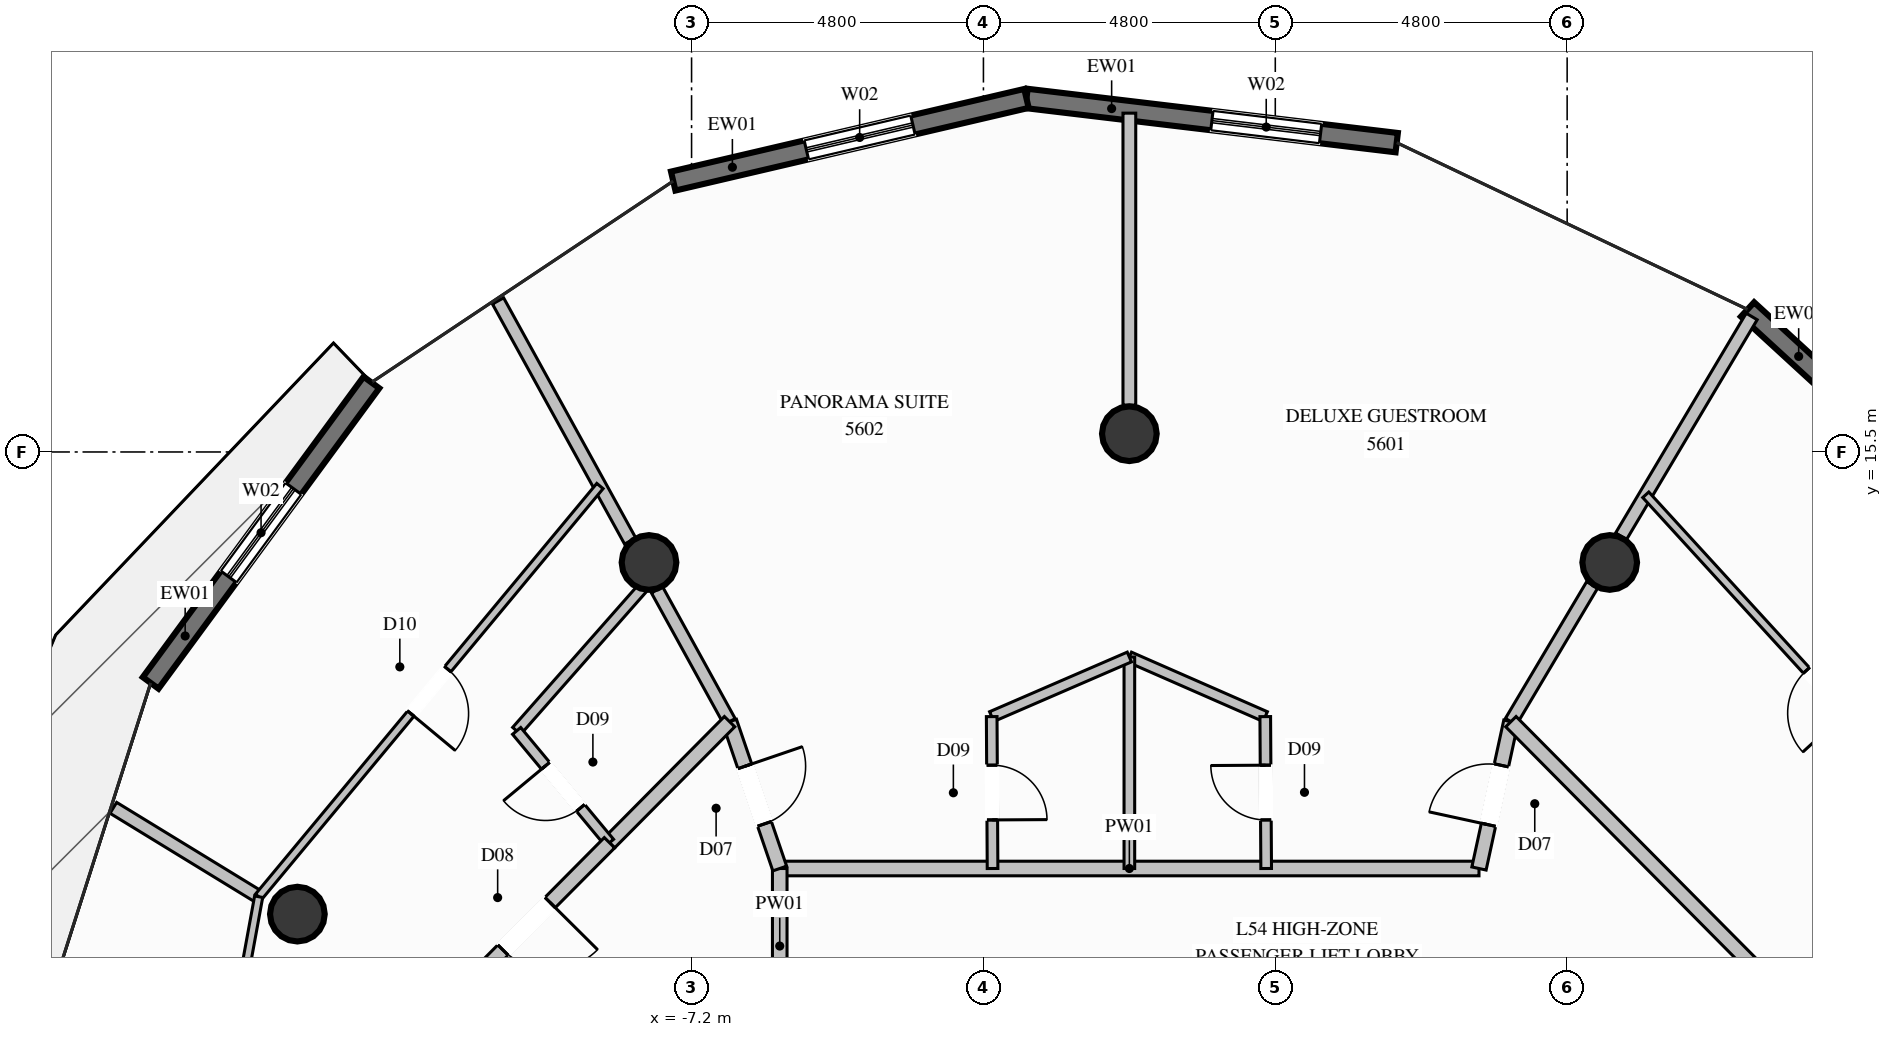
"""IFC4 building model, lengths in metres.
Left out: names, types, materials, properties, quantities, classifications, styles, units other than length and angle.
Written with IfcOpenShell. Run it as: python <this file> out.ifc"""

import sys

from ifc_helpers import new_model, si_unit, direction, frame, frame_2d, origin, origin_2d, place, context, subcontext, project, spatial, rectangle, circle, extrude, element, fill, save


model = new_model("IFC4")
c1 = context("Model", 3, precision=1e-05, world=origin(), true_north=direction((0.0, 1.0)))
c2 = subcontext(c1, "Body", "Model", "MODEL_VIEW")
j1 = project(units=[si_unit("LENGTHUNIT", "METRE"), si_unit("PLANEANGLEUNIT", "RADIAN")], contexts=[c1])
p1 = place(None, origin())
s1 = spatial("IfcSite", under=j1, at=p1, CompositionType="ELEMENT")
p2 = place(p1, origin())
s2 = spatial("IfcBuilding", under=s1, at=p2, CompositionType="ELEMENT")
p3 = place(p2, frame((0.0, 0.0, 209.2)))
s3 = spatial("IfcBuildingStorey", under=s2, at=p3, CompositionType="ELEMENT", Elevation=209.2)
for number, where, z_axis, x_axis in (
    (1, (7.9, 13.683, 0.0), (0.0, 0.0, 1.0), (1.0, 0.0, 0.0)),
    (2, (0.0, 15.8, 0.0), (0.0, 0.0, 1.0), (1.0, 0.0, 0.0)),
    (3, (-7.9, 13.683, 0.0), (0.0, 0.0, 1.0), (1.0, 0.0, 0.0)),
    (4, (-13.683, 7.9, 0.0), (0.0, 0.0, 1.0), (1.0, 0.0, 0.0)),
):
    element("IfcColumn", number, at=place(p3, frame(where, z_axis=z_axis, x_axis=x_axis)), inside=s3, PredefinedType="COLUMN", context=c2, shape_type="SweptSolid", body=[
        extrude(circle(Radius=0.45, at=origin_2d()), origin(), (0.0, 0.0, 1.0), 3.6),
    ])
p4 = place(p3, frame((10.167, 17.844, 0.0), z_axis=(0.0, 0.0, 1.0), x_axis=(0.736523155924, -0.676412330452, 0.0)))
e5 = element("IfcWall", 5, at=p4, inside=s3, PredefinedType="SOLIDWALL", context=c2, shape_type="SweptSolid", body=[
    extrude(rectangle(XDim=6.636, YDim=0.32, at=frame_2d((3.318, 0.0))), origin(), (0.0, 0.0, 1.0), 3.36),
])
p5 = place(p4, frame((2.533, 0.0, 0.35)))
e6 = element("IfcOpeningElement", 6, at=p5, cuts=e5, PredefinedType="OPENING", context=c2, shape_type="SweptSolid", body=[
    extrude(rectangle(XDim=1.8, YDim=2.6, at=frame_2d((0.9, 1.3))), frame((0.0, 0.17, 0.0), z_axis=(0.0, -1.0, 0.0), x_axis=(1.0, 0.0, 0.0)), (0.0, 0.0, 1.0), 0.34),
])
p6 = place(p3, frame((-1.692, 21.314, 0.0), z_axis=(0.0, 0.0, 1.0), x_axis=(0.99294637343, -0.118564326386, 0.0)))
e7 = element("IfcWall", 7, at=p6, inside=s3, PredefinedType="SOLIDWALL", context=c2, shape_type="SweptSolid", body=[
    extrude(rectangle(XDim=6.132, YDim=0.32, at=frame_2d((3.066, 0.0))), origin(), (0.0, 0.0, 1.0), 3.36),
])
p7 = place(p6, frame((3.071, 0.0, 0.35)))
e8 = element("IfcOpeningElement", 8, at=p7, cuts=e7, PredefinedType="OPENING", context=c2, shape_type="SweptSolid", body=[
    extrude(rectangle(XDim=1.8, YDim=2.6, at=frame_2d((0.9, 1.3))), frame((0.0, 0.17, 0.0), z_axis=(0.0, -1.0, 0.0), x_axis=(1.0, 0.0, 0.0)), (0.0, 0.0, 1.0), 0.34),
])
p8 = place(p3, frame((-7.502, 19.955, 0.0), z_axis=(0.0, 0.0, 1.0), x_axis=(0.97372216523, 0.227739203785, 0.0)))
e9 = element("IfcWall", 9, at=p8, inside=s3, PredefinedType="SOLIDWALL", context=c2, shape_type="SweptSolid", body=[
    extrude(rectangle(XDim=5.967, YDim=0.32, at=frame_2d((2.983, 0.0))), origin(), (0.0, 0.0, 1.0), 3.36),
])
p9 = place(p8, frame((2.249, 0.0, 0.35)))
e10 = element("IfcOpeningElement", 10, at=p9, cuts=e9, PredefinedType="OPENING", context=c2, shape_type="SweptSolid", body=[
    extrude(rectangle(XDim=1.8, YDim=2.6, at=frame_2d((0.9, 1.3))), frame((0.0, 0.17, 0.0), z_axis=(0.0, -1.0, 0.0), x_axis=(1.0, 0.0, 0.0)), (0.0, 0.0, 1.0), 0.34),
])
p10 = place(p3, frame((-16.096, 11.702, 0.0), z_axis=(0.0, 0.0, 1.0), x_axis=(0.592141869209, 0.805833733924, 0.0)))
e11 = element("IfcWall", 11, at=p10, inside=s3, PredefinedType="SOLIDWALL", context=c2, shape_type="SweptSolid", body=[
    extrude(rectangle(XDim=6.132, YDim=0.32, at=frame_2d((3.066, 0.0))), origin(), (0.0, 0.0, 1.0), 3.36),
])
p11 = place(p10, frame((2.166, 0.0, 0.35)))
e12 = element("IfcOpeningElement", 12, at=p11, cuts=e11, PredefinedType="OPENING", context=c2, shape_type="SweptSolid", body=[
    extrude(rectangle(XDim=1.8, YDim=2.6, at=frame_2d((0.9, 1.3))), frame((0.0, 0.17, 0.0), z_axis=(0.0, -1.0, 0.0), x_axis=(1.0, 0.0, 0.0)), (0.0, 0.0, 1.0), 0.34),
])
p12 = place(p3, frame((-5.75, 8.65, 0.0), z_axis=(0.0, 0.0, 1.0), x_axis=(1.0, 0.0, 0.0)))
e13 = element("IfcWall", 13, at=p12, inside=s3, PredefinedType="PARTITIONING", context=c2, shape_type="SweptSolid", body=[
    extrude(rectangle(XDim=11.5, YDim=0.24, at=frame_2d((5.75, 0.0))), origin(), (0.0, 0.0, 1.0), 3.36),
])
p13 = place(p3, frame((-5.75, 6.1, 0.0), z_axis=(0.0, 0.0, 1.0), x_axis=(0.0, 1.0, 0.0)))
e14 = element("IfcWall", 14, at=p13, inside=s3, PredefinedType="PARTITIONING", context=c2, shape_type="SweptSolid", body=[
    extrude(rectangle(XDim=2.55, YDim=0.24, at=frame_2d((1.275, 0.0))), origin(), (0.0, 0.0, 1.0), 3.36),
])
p14 = place(p3, frame((6.275, 11.065, 0.0), z_axis=(0.0, 0.0, 1.0), x_axis=(0.510935579326, 0.859619005013, 0.0)))
e15 = element("IfcWall", 15, at=p14, inside=s3, PredefinedType="PARTITIONING", context=c2, shape_type="SweptSolid", body=[
    extrude(rectangle(XDim=2.615, YDim=0.21, at=frame_2d((1.308, 0.0))), origin(), (0.0, 0.0, 1.0), 2.801),
])
p15 = place(p3, frame((8.087, 14.114, 0.0), z_axis=(0.0, 0.0, 1.0), x_axis=(0.510955957876, 0.859606892196, 0.0)))
e16 = element("IfcWall", 16, at=p15, inside=s3, PredefinedType="PARTITIONING", context=c2, shape_type="SweptSolid", body=[
    extrude(rectangle(XDim=4.204, YDim=0.21, at=frame_2d((2.102, 0.0))), origin(), (0.0, 0.0, 1.0), 3.36),
])
p16 = place(p3, frame((-6.575, 11.065, 0.0), z_axis=(0.0, 0.0, 1.0), x_axis=(-0.482312715348, 0.875999112222, 0.0)))
e17 = element("IfcWall", 17, at=p16, inside=s3, PredefinedType="PARTITIONING", context=c2, shape_type="SweptSolid", body=[
    extrude(rectangle(XDim=2.474, YDim=0.21, at=frame_2d((1.237, 0.0))), origin(), (0.0, 0.0, 1.0), 2.801),
])
p17 = place(p3, frame((-8.21, 14.036, 0.0), z_axis=(0.0, 0.0, 1.0), x_axis=(-0.482207793196, 0.876056872686, 0.0)))
e18 = element("IfcWall", 18, at=p17, inside=s3, PredefinedType="PARTITIONING", context=c2, shape_type="SweptSolid", body=[
    extrude(rectangle(XDim=4.507, YDim=0.21, at=frame_2d((2.253, 0.0))), origin(), (0.0, 0.0, 1.0), 3.36),
])
p18 = place(p3, frame((0.0, 12.128, 0.0), z_axis=(0.0, 0.0, 1.0), x_axis=(0.915837910364, -0.401548156439, 0.0)))
e19 = element("IfcWall", 19, at=p18, inside=s3, PredefinedType="PLUMBINGWALL", context=c2, shape_type="SweptSolid", body=[
    extrude(rectangle(XDim=2.44, YDim=0.175, at=frame_2d((1.22, 0.0))), origin(), (0.0, 0.0, 1.0), 3.36),
])
p19 = place(p3, frame((0.0, 12.128, 0.0), z_axis=(0.0, 0.0, 1.0), x_axis=(0.0, -1.0, 0.0)))
e20 = element("IfcWall", 20, at=p19, inside=s3, PredefinedType="PLUMBINGWALL", context=c2, shape_type="SweptSolid", body=[
    extrude(rectangle(XDim=3.478, YDim=0.175, at=frame_2d((1.739, 0.0))), origin(), (0.0, 0.0, 1.0), 3.36),
])
p20 = place(p3, frame((2.25, 8.65, 0.0), z_axis=(0.0, 0.0, 1.0), x_axis=(-0.005961582878, 0.999982229607, 0.0)))
e21 = element("IfcWall", 21, at=p20, inside=s3, PredefinedType="PLUMBINGWALL", context=c2, shape_type="SweptSolid", body=[
    extrude(rectangle(XDim=2.498, YDim=0.175, at=frame_2d((1.249, 0.0))), origin(), (0.0, 0.0, 1.0), 3.36),
])
p21 = place(p20, frame((0.799, 0.0, 0.0)))
e22 = element("IfcOpeningElement", 22, at=p21, cuts=e21, PredefinedType="OPENING", context=c2, shape_type="SweptSolid", body=[
    extrude(rectangle(XDim=0.9, YDim=2.1, at=frame_2d((0.45, 1.05))), frame((0.0, 0.098, 0.0), z_axis=(0.0, -1.0, 0.0), x_axis=(1.0, 0.0, 0.0)), (0.0, 0.0, 1.0), 0.195),
])
p22 = place(p3, frame((0.0, 16.27, 0.0), z_axis=(0.0, 0.0, 1.0), x_axis=(0.0, 1.0, 0.0)))
e23 = element("IfcWall", 23, at=p22, inside=s3, PredefinedType="PARTITIONING", context=c2, shape_type="SweptSolid", body=[
    extrude(rectangle(XDim=4.802, YDim=0.21, at=frame_2d((2.401, 0.0))), origin(), (0.0, 0.0, 1.0), 3.36),
])
p23 = place(p3, frame((5.75, 8.65, 0.0), z_axis=(0.0, 0.0, 1.0), x_axis=(0.212388632151, 0.977185278713, 0.0)))
e24 = element("IfcWall", 24, at=p23, inside=s3, PredefinedType="PARTITIONING", context=c2, shape_type="SweptSolid", body=[
    extrude(rectangle(XDim=2.471, YDim=0.24, at=frame_2d((1.236, 0.0))), origin(), (0.0, 0.0, 1.0), 3.36),
])
p24 = place(p23, frame((0.736, 0.0, 0.0)))
e25 = element("IfcOpeningElement", 25, at=p24, cuts=e24, PredefinedType="OPENING", context=c2, shape_type="SweptSolid", body=[
    extrude(rectangle(XDim=1.0, YDim=2.2, at=frame_2d((0.5, 1.1))), frame((0.0, 0.13, 0.0), z_axis=(0.0, -1.0, 0.0), x_axis=(1.0, 0.0, 0.0)), (0.0, 0.0, 1.0), 0.26),
])
p25 = place(p3, frame((-2.264, 11.148, 0.0), z_axis=(0.0, 0.0, 1.0), x_axis=(0.917710808699, 0.397249130391, 0.0)))
e26 = element("IfcWall", 26, at=p25, inside=s3, PredefinedType="PLUMBINGWALL", context=c2, shape_type="SweptSolid", body=[
    extrude(rectangle(XDim=2.467, YDim=0.175, at=frame_2d((1.233, 0.0))), origin(), (0.0, 0.0, 1.0), 3.36),
])
p26 = place(p3, frame((-2.264, 11.148, 0.0), z_axis=(0.0, 0.0, 1.0), x_axis=(0.005570671967, -0.999984483687, 0.0)))
e27 = element("IfcWall", 27, at=p26, inside=s3, PredefinedType="PLUMBINGWALL", context=c2, shape_type="SweptSolid", body=[
    extrude(rectangle(XDim=2.498, YDim=0.175, at=frame_2d((1.249, 0.0))), origin(), (0.0, 0.0, 1.0), 3.36),
])
p27 = place(p26, frame((0.799, 0.0, 0.0)))
e28 = element("IfcOpeningElement", 28, at=p27, cuts=e27, PredefinedType="OPENING", context=c2, shape_type="SweptSolid", body=[
    extrude(rectangle(XDim=0.9, YDim=2.1, at=frame_2d((0.45, 1.05))), frame((0.0, 0.098, 0.0), z_axis=(0.0, -1.0, 0.0), x_axis=(1.0, 0.0, 0.0)), (0.0, 0.0, 1.0), 0.195),
])
p28 = place(p3, frame((-6.575, 11.065, 0.0), z_axis=(0.0, 0.0, 1.0), x_axis=(0.323250422642, -0.946313459833, 0.0)))
e29 = element("IfcWall", 29, at=p28, inside=s3, PredefinedType="PARTITIONING", context=c2, shape_type="SweptSolid", body=[
    extrude(rectangle(XDim=2.552, YDim=0.24, at=frame_2d((1.276, 0.0))), origin(), (0.0, 0.0, 1.0), 3.36),
])
p29 = place(p28, frame((0.776, 0.0, 0.0)))
e30 = element("IfcOpeningElement", 30, at=p29, cuts=e29, PredefinedType="OPENING", context=c2, shape_type="SweptSolid", body=[
    extrude(rectangle(XDim=1.0, YDim=2.2, at=frame_2d((0.5, 1.1))), frame((0.0, 0.13, 0.0), z_axis=(0.0, -1.0, 0.0), x_axis=(1.0, 0.0, 0.0)), (0.0, 0.0, 1.0), 0.26),
])
p30 = place(p3, frame((-6.575, 11.065, 0.0), z_axis=(0.0, 0.0, 1.0), x_axis=(-0.704271845888, -0.709930395947, 0.0)))
e31 = element("IfcWall", 31, at=p30, inside=s3, PredefinedType="PARTITIONING", context=c2, shape_type="SweptSolid", body=[
    extrude(rectangle(XDim=2.804, YDim=0.24, at=frame_2d((1.402, 0.0))), origin(), (0.0, 0.0, 1.0), 3.36),
])
p31 = place(p3, frame((-7.87, 13.417, 0.0), z_axis=(0.0, 0.0, 1.0), x_axis=(-0.661193309015, -0.750215574428, 0.0)))
e32 = element("IfcWall", 32, at=p31, inside=s3, PredefinedType="PLUMBINGWALL", context=c2, shape_type="SweptSolid", body=[
    extrude(rectangle(XDim=3.338, YDim=0.175, at=frame_2d((1.669, 0.0))), origin(), (0.0, 0.0, 1.0), 2.929),
])
p32 = place(p3, frame((-8.55, 9.074, 0.0), z_axis=(0.0, 0.0, 1.0), x_axis=(-0.638766783966, 0.769400413115, 0.0)))
e33 = element("IfcWall", 33, at=p32, inside=s3, PredefinedType="PLUMBINGWALL", context=c2, shape_type="SweptSolid", body=[
    extrude(rectangle(XDim=2.39, YDim=0.175, at=frame_2d((1.195, 0.0))), origin(), (0.0, 0.0, 1.0), 3.36),
])
p33 = place(p32, frame((0.745, 0.0, 0.0)))
e34 = element("IfcOpeningElement", 34, at=p33, cuts=e33, PredefinedType="OPENING", context=c2, shape_type="SweptSolid", body=[
    extrude(rectangle(XDim=0.9, YDim=2.1, at=frame_2d((0.45, 1.05))), frame((0.0, 0.098, 0.0), z_axis=(0.0, -1.0, 0.0), x_axis=(1.0, 0.0, 0.0)), (0.0, 0.0, 1.0), 0.195),
])
p34 = place(p3, frame((-14.32, 8.186, 0.0), z_axis=(0.0, 0.0, 1.0), x_axis=(-0.853055569856, 0.521820078895, 0.0)))
e35 = element("IfcWall", 35, at=p34, inside=s3, PredefinedType="PARTITIONING", context=c2, shape_type="SweptSolid", body=[
    extrude(rectangle(XDim=2.802, YDim=0.21, at=frame_2d((1.401, 0.0))), origin(), (0.0, 0.0, 1.0), 3.36),
])
p35 = place(p3, frame((-8.55, 9.074, 0.0), z_axis=(0.0, 0.0, 1.0), x_axis=(-0.704390934975, -0.709812236246, 0.0)))
e36 = element("IfcWall", 36, at=p35, inside=s3, PredefinedType="PARTITIONING", context=c2, shape_type="SweptSolid", body=[
    extrude(rectangle(XDim=3.873, YDim=0.24, at=frame_2d((1.937, 0.0))), origin(), (0.0, 0.0, 1.0), 3.36),
])
p36 = place(p35, frame((1.386, 0.0, 0.0)))
e37 = element("IfcOpeningElement", 37, at=p36, cuts=e36, PredefinedType="OPENING", context=c2, shape_type="SweptSolid", body=[
    extrude(rectangle(XDim=1.1, YDim=2.3, at=frame_2d((0.55, 1.15))), frame((0.0, 0.13, 0.0), z_axis=(0.0, -1.0, 0.0), x_axis=(1.0, 0.0, 0.0)), (0.0, 0.0, 1.0), 0.26),
])
p37 = place(p3, frame((-8.707, 14.94, 0.0), z_axis=(0.0, 0.0, 1.0), x_axis=(-0.639161138837, -0.769072843495, 0.0)))
e38 = element("IfcWall", 38, at=p37, inside=s3, PredefinedType="PARTITIONING", context=c2, shape_type="SweptSolid", body=[
    extrude(rectangle(XDim=8.782, YDim=0.135, at=frame_2d((4.391, 0.0))), origin(), (0.0, 0.0, 1.0), 3.36),
])
p38 = place(p37, frame((3.916, 0.0, 0.0)))
e39 = element("IfcOpeningElement", 39, at=p38, cuts=e38, PredefinedType="OPENING", context=c2, shape_type="SweptSolid", body=[
    extrude(rectangle(XDim=0.95, YDim=2.1, at=frame_2d((0.475, 1.05))), frame((0.0, 0.078, 0.0), z_axis=(0.0, -1.0, 0.0), x_axis=(1.0, 0.0, 0.0)), (0.0, 0.0, 1.0), 0.155),
])
p39 = place(p3, frame((-14.32, 8.186, 0.0), z_axis=(0.0, 0.0, 1.0), x_axis=(-0.179886727607, -0.983687331031, 0.0)))
e40 = element("IfcWall", 40, at=p39, inside=s3, PredefinedType="PARTITIONING", context=c2, shape_type="SweptSolid", body=[
    extrude(rectangle(XDim=8.389, YDim=0.135, at=frame_2d((4.194, 0.0))), origin(), (0.0, 0.0, 1.0), 2.929),
])
p40 = place(p39, frame((3.719, 0.0, 0.0)))
e41 = element("IfcOpeningElement", 41, at=p40, cuts=e40, PredefinedType="OPENING", context=c2, shape_type="SweptSolid", body=[
    extrude(rectangle(XDim=0.95, YDim=2.1, at=frame_2d((0.475, 1.05))), frame((0.0, 0.078, 0.0), z_axis=(0.0, -1.0, 0.0), x_axis=(1.0, 0.0, 0.0)), (0.0, 0.0, 1.0), 0.155),
])
p41 = place(p3, frame((10.978, 6.325, 0.0), z_axis=(0.0, 0.0, 1.0), x_axis=(-0.704340920508, 0.709861865223, 0.0)))
e42 = element("IfcWall", 42, at=p41, inside=s3, PredefinedType="PARTITIONING", context=c2, shape_type="SweptSolid", body=[
    extrude(rectangle(XDim=6.677, YDim=0.24, at=frame_2d((3.339, 0.0))), origin(), (0.0, 0.0, 1.0), 3.36),
])
p42 = place(p3, frame((14.418, 8.318, 0.0), z_axis=(0.0, 0.0, 1.0), x_axis=(-0.674924557891, 0.73788674006, 0.0)))
e43 = element("IfcWall", 43, at=p42, inside=s3, PredefinedType="PARTITIONING", context=c2, shape_type="SweptSolid", body=[
    extrude(rectangle(XDim=8.779, YDim=0.135, at=frame_2d((4.389, 0.0))), origin(), (0.0, 0.0, 1.0), 3.36),
])
p43 = place(p42, frame((3.914, 0.0, 0.0)))
e44 = element("IfcOpeningElement", 44, at=p43, cuts=e43, PredefinedType="OPENING", context=c2, shape_type="SweptSolid", body=[
    extrude(rectangle(XDim=0.95, YDim=2.1, at=frame_2d((0.475, 1.05))), frame((0.0, 0.078, 0.0), z_axis=(0.0, -1.0, 0.0), x_axis=(1.0, 0.0, 0.0)), (0.0, 0.0, 1.0), 0.155),
])
p44 = place(p7, origin())
e45 = element("IfcWindow", 45, at=p44, inside=s3, PartitioningType="SINGLE_PANEL", PredefinedType="WINDOW", context=c2, shape_type="SweptSolid", body=[
    extrude(rectangle(XDim=1.8, YDim=2.6, at=frame_2d((0.9, 1.3))), frame((0.0, 0.03, 0.0), z_axis=(0.0, -1.0, 0.0), x_axis=(1.0, 0.0, 0.0)), (0.0, 0.0, 1.0), 0.06),
])
fill(e8, e45)
p45 = place(p9, origin())
e46 = element("IfcWindow", 46, at=p45, inside=s3, PartitioningType="SINGLE_PANEL", PredefinedType="WINDOW", context=c2, shape_type="SweptSolid", body=[
    extrude(rectangle(XDim=1.8, YDim=2.6, at=frame_2d((0.9, 1.3))), frame((0.0, 0.03, 0.0), z_axis=(0.0, -1.0, 0.0), x_axis=(1.0, 0.0, 0.0)), (0.0, 0.0, 1.0), 0.06),
])
fill(e10, e46)
p46 = place(p11, origin())
e47 = element("IfcWindow", 47, at=p46, inside=s3, PartitioningType="SINGLE_PANEL", PredefinedType="WINDOW", context=c2, shape_type="SweptSolid", body=[
    extrude(rectangle(XDim=1.8, YDim=2.6, at=frame_2d((0.9, 1.3))), frame((0.0, 0.03, 0.0), z_axis=(0.0, -1.0, 0.0), x_axis=(1.0, 0.0, 0.0)), (0.0, 0.0, 1.0), 0.06),
])
fill(e12, e47)
p47 = place(p21, origin())
e48 = element("IfcDoor", 48, at=p47, inside=s3, OperationType="SINGLE_SWING_RIGHT", PredefinedType="DOOR", context=c2, shape_type="SweptSolid", body=[
    extrude(rectangle(XDim=0.9, YDim=2.1, at=frame_2d((0.45, 1.05))), frame((0.0, 0.025, 0.0), z_axis=(0.0, -1.0, 0.0), x_axis=(1.0, 0.0, 0.0)), (0.0, 0.0, 1.0), 0.05),
])
fill(e22, e48)
p48 = place(p24, origin())
e49 = element("IfcDoor", 49, at=p48, inside=s3, OperationType="SINGLE_SWING_LEFT", PredefinedType="DOOR", context=c2, shape_type="SweptSolid", body=[
    extrude(rectangle(XDim=1.0, YDim=2.2, at=frame_2d((0.5, 1.1))), frame((0.0, 0.025, 0.0), z_axis=(0.0, -1.0, 0.0), x_axis=(1.0, 0.0, 0.0)), (0.0, 0.0, 1.0), 0.05),
])
fill(e25, e49)
p49 = place(p27, origin())
e50 = element("IfcDoor", 50, at=p49, inside=s3, OperationType="SINGLE_SWING_RIGHT", PredefinedType="DOOR", context=c2, shape_type="SweptSolid", body=[
    extrude(rectangle(XDim=0.9, YDim=2.1, at=frame_2d((0.45, 1.05))), frame((0.0, 0.025, 0.0), z_axis=(0.0, -1.0, 0.0), x_axis=(1.0, 0.0, 0.0)), (0.0, 0.0, 1.0), 0.05),
])
fill(e28, e50)
p50 = place(p29, origin())
e51 = element("IfcDoor", 51, at=p50, inside=s3, OperationType="SINGLE_SWING_LEFT", PredefinedType="DOOR", context=c2, shape_type="SweptSolid", body=[
    extrude(rectangle(XDim=1.0, YDim=2.2, at=frame_2d((0.5, 1.1))), frame((0.0, 0.025, 0.0), z_axis=(0.0, -1.0, 0.0), x_axis=(1.0, 0.0, 0.0)), (0.0, 0.0, 1.0), 0.05),
])
fill(e30, e51)
p51 = place(p33, origin())
e52 = element("IfcDoor", 52, at=p51, inside=s3, OperationType="SINGLE_SWING_RIGHT", PredefinedType="DOOR", context=c2, shape_type="SweptSolid", body=[
    extrude(rectangle(XDim=0.9, YDim=2.1, at=frame_2d((0.45, 1.05))), frame((0.0, 0.025, 0.0), z_axis=(0.0, -1.0, 0.0), x_axis=(1.0, 0.0, 0.0)), (0.0, 0.0, 1.0), 0.05),
])
fill(e34, e52)
p52 = place(p36, origin())
e53 = element("IfcDoor", 53, at=p52, inside=s3, OperationType="SINGLE_SWING_LEFT", PredefinedType="DOOR", context=c2, shape_type="SweptSolid", body=[
    extrude(rectangle(XDim=1.1, YDim=2.3, at=frame_2d((0.55, 1.15))), frame((0.0, 0.025, 0.0), z_axis=(0.0, -1.0, 0.0), x_axis=(1.0, 0.0, 0.0)), (0.0, 0.0, 1.0), 0.05),
])
fill(e37, e53)
p53 = place(p38, origin())
e54 = element("IfcDoor", 54, at=p53, inside=s3, OperationType="SINGLE_SWING_RIGHT", PredefinedType="DOOR", context=c2, shape_type="SweptSolid", body=[
    extrude(rectangle(XDim=0.95, YDim=2.1, at=frame_2d((0.475, 1.05))), frame((0.0, 0.025, 0.0), z_axis=(0.0, -1.0, 0.0), x_axis=(1.0, 0.0, 0.0)), (0.0, 0.0, 1.0), 0.05),
])
fill(e39, e54)
p54 = place(p43, origin())
e55 = element("IfcDoor", 55, at=p54, inside=s3, OperationType="SINGLE_SWING_LEFT", PredefinedType="DOOR", context=c2, shape_type="SweptSolid", body=[
    extrude(rectangle(XDim=0.95, YDim=2.1, at=frame_2d((0.475, 1.05))), frame((0.0, 0.025, 0.0), z_axis=(0.0, -1.0, 0.0), x_axis=(1.0, 0.0, 0.0)), (0.0, 0.0, 1.0), 0.05),
])
fill(e44, e55)
save(model, sys.argv[1])
